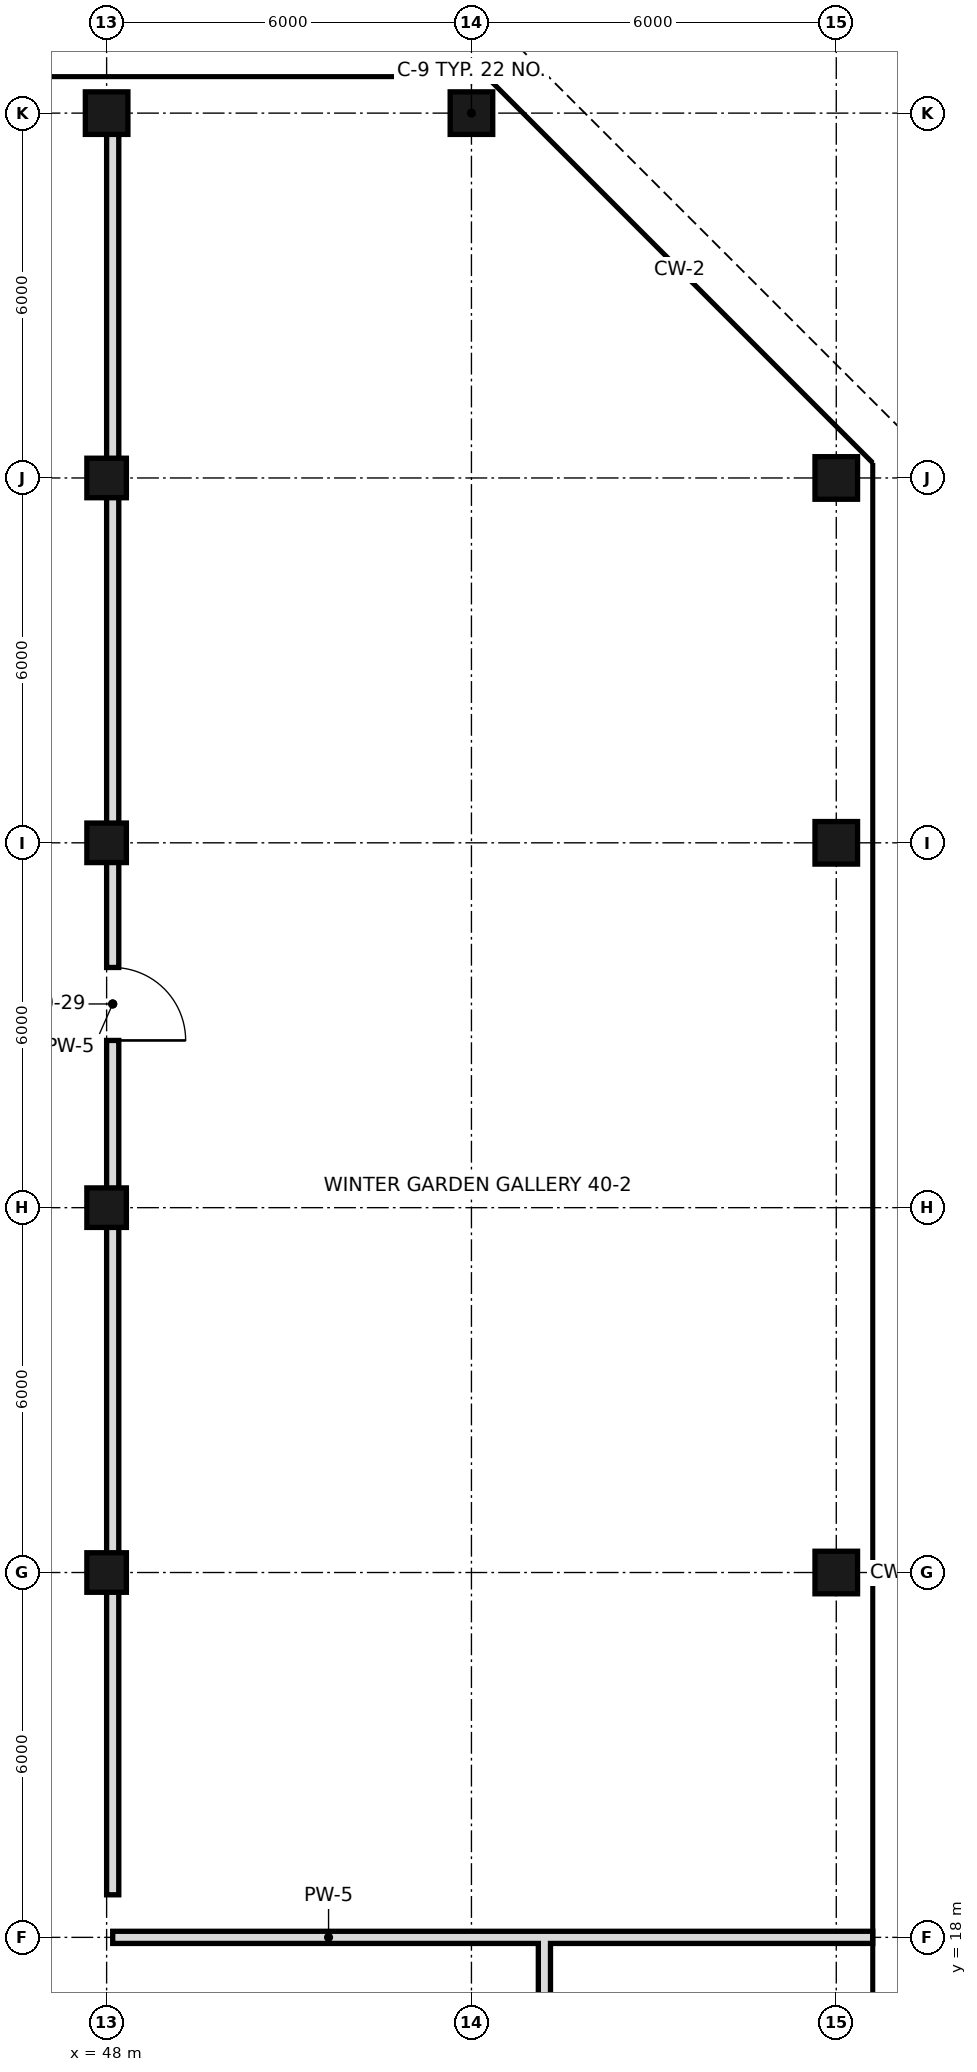
"""IFC4 building model, lengths in metres.
Left out: names, types, materials, properties, quantities, classifications, styles, units other than length and angle.
Written with IfcOpenShell. Run it as: python <this file> out.ifc"""

import sys

from ifc_helpers import new_model, si_unit, direction, frame, frame_2d, origin, origin_2d, place, context, subcontext, project, spatial, rectangle, hollow_rectangle, extrude, element, fill, save


model = new_model("IFC4")
c1 = context("Model", 3, precision=1e-05, world=origin(), true_north=direction((0.0, 1.0)))
c2 = subcontext(c1, "Body", "Model", "MODEL_VIEW")
j1 = project(units=[si_unit("LENGTHUNIT", "METRE"), si_unit("PLANEANGLEUNIT", "RADIAN")], contexts=[c1])
p1 = place(None, origin())
s1 = spatial("IfcSite", under=j1, at=p1, CompositionType="ELEMENT")
p2 = place(p1, origin())
s2 = spatial("IfcBuilding", under=s1, at=p2, CompositionType="ELEMENT")
p3 = place(p2, frame((0.0, 0.0, 174.4)))
s3 = spatial("IfcBuildingStorey", under=s2, at=p3, CompositionType="ELEMENT", Elevation=174.4)
for number, where, z_axis, x_axis in (
    (1, (48.0, 24.0, 0.0), (0.0, 0.0, 1.0), (1.0, 0.0, 0.0)),
    (2, (48.0, 30.0, 0.0), (0.0, 0.0, 1.0), (1.0, 0.0, 0.0)),
    (3, (48.0, 36.0, 0.0), (0.0, 0.0, 1.0), (1.0, 0.0, 0.0)),
    (4, (48.0, 42.0, 0.0), (0.0, 0.0, 1.0), (1.0, 0.0, 0.0)),
):
    element("IfcColumn", number, at=place(p3, frame(where, z_axis=z_axis, x_axis=x_axis)), inside=s3, PredefinedType="COLUMN", context=c2, shape_type="SweptSolid", body=[
        extrude(hollow_rectangle(XDim=0.65, YDim=0.65, WallThickness=0.032, at=origin_2d()), origin(), (0.0, 0.0, 1.0), 3.6),
    ])
for number, where, z_axis, x_axis in (
    (5, (48.0, 48.0, 0.0), (0.0, 0.0, 1.0), (1.0, 0.0, 0.0)),
    (6, (54.0, 48.0, 0.0), (0.0, 0.0, 1.0), (1.0, 0.0, 0.0)),
    (7, (60.0, 24.0, 0.0), (0.0, 0.0, 1.0), (1.0, 0.0, 0.0)),
    (8, (60.0, 36.0, 0.0), (0.0, 0.0, 1.0), (1.0, 0.0, 0.0)),
    (9, (60.0, 42.0, 0.0), (0.0, 0.0, 1.0), (1.0, 0.0, 0.0)),
):
    element("IfcColumn", number, at=place(p3, frame(where, z_axis=z_axis, x_axis=x_axis)), inside=s3, PredefinedType="COLUMN", context=c2, shape_type="SweptSolid", body=[
        extrude(hollow_rectangle(XDim=0.7, YDim=0.7, WallThickness=0.036, at=origin_2d()), origin(), (0.0, 0.0, 1.0), 3.6),
    ])
p4 = place(p3, frame((48.1, 18.7, 0.0), z_axis=(0.0, 0.0, 1.0), x_axis=(0.0, 1.0, 0.0)))
e10 = element("IfcWall", 10, at=p4, inside=s3, PredefinedType="SOLIDWALL", context=c2, shape_type="SweptSolid", body=[
    extrude(rectangle(XDim=29.3, YDim=0.2, at=frame_2d((14.65, 0.0))), origin(), (0.0, 0.0, 1.0), 2.72),
])
p5 = place(p4, frame((14.05, 0.0, 0.0)))
e11 = element("IfcOpeningElement", 11, at=p5, cuts=e10, PredefinedType="OPENING", context=c2, shape_type="SweptSolid", body=[
    extrude(rectangle(XDim=1.2, YDim=2.4, at=frame_2d((0.6, 1.2))), frame((0.0, 0.11, 0.0), z_axis=(0.0, -1.0, 0.0), x_axis=(1.0, 0.0, 0.0)), (0.0, 0.0, 1.0), 0.22),
])
p6 = place(p3, frame((55.2, 10.8, 0.0), z_axis=(0.0, 0.0, 1.0), x_axis=(0.0, 1.0, 0.0)))
e12 = element("IfcWall", 12, at=p6, inside=s3, PredefinedType="SOLIDWALL", context=c2, shape_type="SweptSolid", body=[
    extrude(rectangle(XDim=7.2, YDim=0.2, at=frame_2d((3.6, 0.0))), origin(), (0.0, 0.0, 1.0), 2.72),
])
p7 = place(p3, frame((48.1, 18.0, 0.0), z_axis=(0.0, 0.0, 1.0), x_axis=(1.0, 0.0, 0.0)))
e13 = element("IfcWall", 13, at=p7, inside=s3, PredefinedType="SOLIDWALL", context=c2, shape_type="SweptSolid", body=[
    extrude(rectangle(XDim=7.1, YDim=0.2, at=frame_2d((3.55, 0.0))), origin(), (0.0, 0.0, 1.0), 2.72),
])
p8 = place(p3, frame((55.2, 18.0, 0.0), z_axis=(0.0, 0.0, 1.0), x_axis=(1.0, 0.0, 0.0)))
e14 = element("IfcWall", 14, at=p8, inside=s3, PredefinedType="SOLIDWALL", context=c2, shape_type="SweptSolid", body=[
    extrude(rectangle(XDim=5.4, YDim=0.2, at=frame_2d((2.7, 0.0))), origin(), (0.0, 0.0, 1.0), 2.72),
])
p9 = place(p5, frame((1.2, 0.0, 0.0), z_axis=(0.0, 0.0, 1.0), x_axis=(-1.0, 0.0, 0.0)))
e15 = element("IfcDoor", 15, at=p9, inside=s3, OperationType="SINGLE_SWING_RIGHT", PredefinedType="DOOR", context=c2, shape_type="SweptSolid", body=[
    extrude(rectangle(XDim=1.2, YDim=2.4, at=frame_2d((0.6, 1.2))), frame((0.0, 0.025, 0.0), z_axis=(0.0, -1.0, 0.0), x_axis=(1.0, 0.0, 0.0)), (0.0, 0.0, 1.0), 0.05),
])
fill(e11, e15)
save(model, sys.argv[1])
